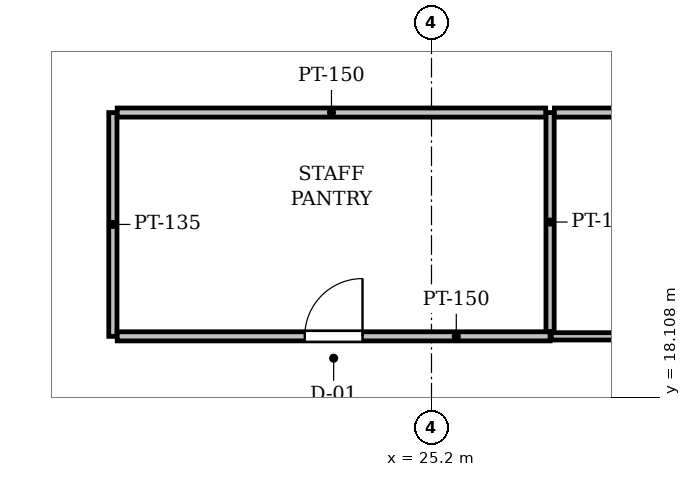
"""IFC4 building model, lengths in metres.
Left out: names, types, materials, properties, quantities, classifications, styles, units other than length and angle.
Written with IfcOpenShell. Run it as: python <this file> out.ifc"""

import sys

from ifc_helpers import new_model, si_unit, direction, frame, frame_2d, origin, place, context, subcontext, project, spatial, rectangle, extrude, element, fill, save


model = new_model("IFC4")
c1 = context("Model", 3, precision=1e-05, world=origin(), true_north=direction((0.0, 1.0)))
c2 = subcontext(c1, "Body", "Model", "MODEL_VIEW")
j1 = project(units=[si_unit("LENGTHUNIT", "METRE"), si_unit("PLANEANGLEUNIT", "RADIAN")], contexts=[c1])
p1 = place(None, origin())
s1 = spatial("IfcSite", under=j1, at=p1, CompositionType="ELEMENT")
p2 = place(p1, origin())
s2 = spatial("IfcBuilding", under=s1, at=p2, CompositionType="ELEMENT")
p3 = place(p2, frame((0.0, 0.0, 262.2)))
s3 = spatial("IfcBuildingStorey", under=s2, at=p3, CompositionType="ELEMENT", Elevation=262.2)
p4 = place(p3, frame((19.96, 22.79, 0.0), z_axis=(0.0, 0.0, 1.0), x_axis=(0.0, -1.0, 0.0)))
e1 = element("IfcWall", 1, at=p4, inside=s3, PredefinedType="PARTITIONING", context=c2, shape_type="SweptSolid", body=[
    extrude(rectangle(XDim=3.68, YDim=0.135, at=frame_2d((1.84, 0.0))), origin(), (0.0, 0.0, 1.0), 3.725),
])
p5 = place(p3, frame((20.031, 19.11, 0.0), z_axis=(0.0, 0.0, 1.0), x_axis=(1.0, 0.0, 0.0)))
e2 = element("IfcWall", 2, at=p5, inside=s3, PredefinedType="PARTITIONING", context=c2, shape_type="SweptSolid", body=[
    extrude(rectangle(XDim=7.118, YDim=0.15, at=frame_2d((3.559, 0.0))), origin(), (0.0, 0.0, 1.0), 3.319),
])
p6 = place(p5, frame((3.084, 0.0, 0.0)))
e3 = element("IfcOpeningElement", 3, at=p6, cuts=e2, PredefinedType="OPENING", context=c2, shape_type="SweptSolid", body=[
    extrude(rectangle(XDim=0.95, YDim=2.15, at=frame_2d((0.475, 1.075))), frame((0.0, 0.085, 0.0), z_axis=(0.0, -1.0, 0.0), x_axis=(1.0, 0.0, 0.0)), (0.0, 0.0, 1.0), 0.17),
])
p7 = place(p3, frame((27.15, 19.189, 0.0), z_axis=(0.0, 0.0, 1.0), x_axis=(0.0, 1.0, 0.0)))
e4 = element("IfcWall", 4, at=p7, inside=s3, PredefinedType="PARTITIONING", context=c2, shape_type="SweptSolid", body=[
    extrude(rectangle(XDim=3.601, YDim=0.135, at=frame_2d((1.801, 0.0))), origin(), (0.0, 0.0, 1.0), 3.725),
])
p8 = place(p3, frame((27.079, 22.79, 0.0), z_axis=(0.0, 0.0, 1.0), x_axis=(-1.0, 0.0, 0.0)))
e5 = element("IfcWall", 5, at=p8, inside=s3, PredefinedType="PARTITIONING", context=c2, shape_type="SweptSolid", body=[
    extrude(rectangle(XDim=7.047, YDim=0.15, at=frame_2d((3.523, 0.0))), origin(), (0.0, 0.0, 1.0), 3.319),
])
p9 = place(p3, frame((34.261, 22.79, 0.0), z_axis=(0.0, 0.0, 1.0), x_axis=(-1.0, 0.0, 0.0)))
e6 = element("IfcWall", 6, at=p9, inside=s3, PredefinedType="PARTITIONING", context=c2, shape_type="SweptSolid", body=[
    extrude(rectangle(XDim=7.04, YDim=0.15, at=frame_2d((3.52, 0.0))), origin(), (0.0, 0.0, 1.0), 3.319),
])
p10 = place(p3, frame((27.17, 19.11, 0.0), z_axis=(0.0, 0.0, 1.0), x_axis=(1.0, 0.0, 0.0)))
e7 = element("IfcWall", 7, at=p10, inside=s3, PredefinedType="PARTITIONING", context=c2, shape_type="SweptSolid", body=[
    extrude(rectangle(XDim=1.63, YDim=0.12, at=frame_2d((0.815, 0.0))), origin(), (0.0, 0.0, 1.0), 3.725),
])
p11 = place(p6, origin())
e8 = element("IfcDoor", 8, at=p11, inside=s3, OperationType="SINGLE_SWING_RIGHT", PredefinedType="DOOR", context=c2, shape_type="SweptSolid", body=[
    extrude(rectangle(XDim=0.95, YDim=2.15, at=frame_2d((0.475, 1.075))), frame((0.0, 0.025, 0.0), z_axis=(0.0, -1.0, 0.0), x_axis=(1.0, 0.0, 0.0)), (0.0, 0.0, 1.0), 0.05),
])
fill(e3, e8)
save(model, sys.argv[1])
